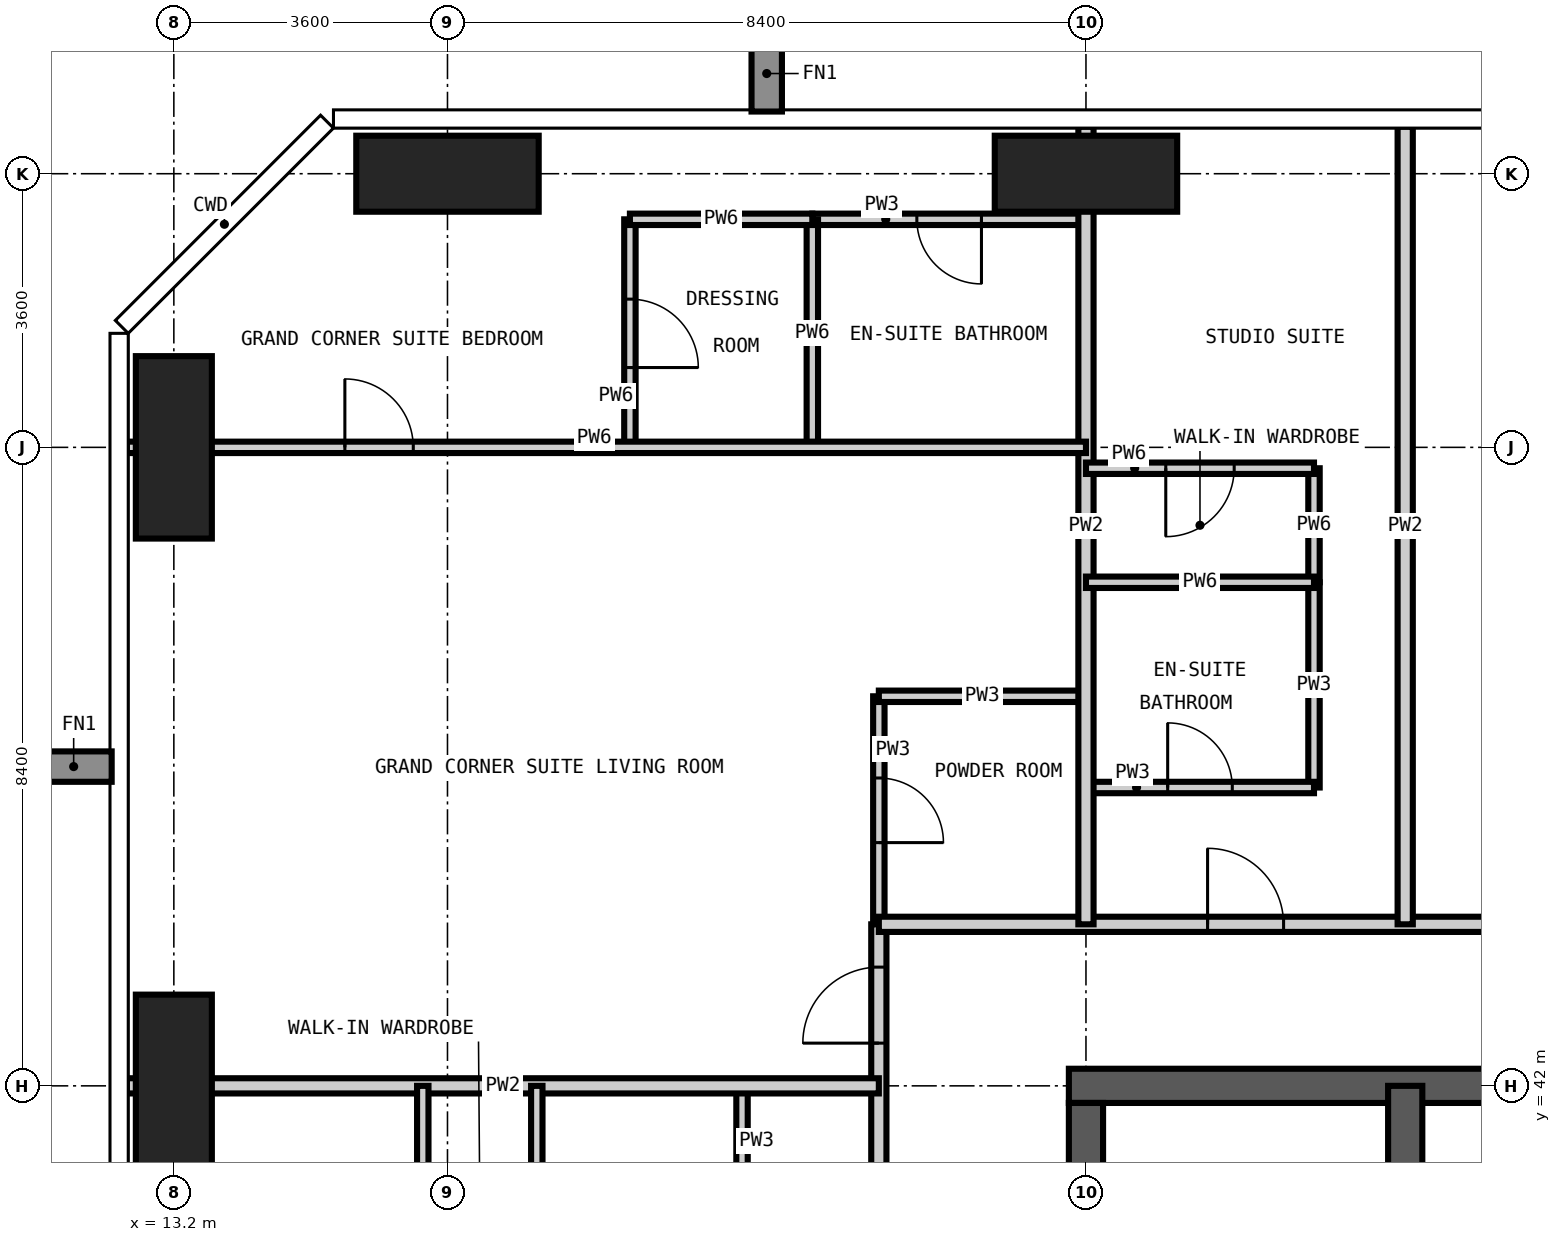
"""IFC4 building model, lengths in metres.
Left out: names, types, materials, properties, quantities, classifications, styles, units other than length and angle.
Written with IfcOpenShell. Run it as: python <this file> out.ifc"""

import sys

from ifc_helpers import new_model, si_unit, direction, frame, frame_2d, origin, origin_2d, place, context, subcontext, project, spatial, rectangle, extrude, element, fill, save


model = new_model("IFC4")
c1 = context("Model", 3, precision=1e-05, world=origin(), true_north=direction((0.0, 1.0)))
c2 = subcontext(c1, "Body", "Model", "MODEL_VIEW")
j1 = project(units=[si_unit("LENGTHUNIT", "METRE"), si_unit("PLANEANGLEUNIT", "RADIAN")], contexts=[c1])
p1 = place(None, origin())
s1 = spatial("IfcSite", under=j1, at=p1, CompositionType="ELEMENT")
p2 = place(p1, origin())
s2 = spatial("IfcBuilding", under=s1, at=p2, CompositionType="ELEMENT")
p3 = place(p2, frame((0.0, 0.0, 264.6)))
s3 = spatial("IfcBuildingStorey", under=s2, at=p3, CompositionType="ELEMENT", Elevation=264.6)
for number, where, z_axis, x_axis in (
    (1, (13.2, 42.0, -0.35), (0.0, 0.0, 1.0), (1.0, 0.0, 0.0)),
    (2, (13.2, 50.4, -0.35), (0.0, 0.0, 1.0), (1.0, 0.0, 0.0)),
):
    element("IfcColumn", number, at=place(p3, frame(where, z_axis=z_axis, x_axis=x_axis)), inside=s3, PredefinedType="COLUMN", context=c2, shape_type="SweptSolid", body=[
        extrude(rectangle(XDim=1.0, YDim=2.4, at=origin_2d()), origin(), (0.0, 0.0, 1.0), 3.9),
    ])
for number, where, z_axis, x_axis in (
    (3, (16.8, 54.0, -0.35), (0.0, 0.0, 1.0), (1.0, 0.0, 0.0)),
    (4, (25.2, 54.0, -0.35), (0.0, 0.0, 1.0), (1.0, 0.0, 0.0)),
):
    element("IfcColumn", number, at=place(p3, frame(where, z_axis=z_axis, x_axis=x_axis)), inside=s3, PredefinedType="COLUMN", context=c2, shape_type="SweptSolid", body=[
        extrude(rectangle(XDim=2.4, YDim=1.0, at=origin_2d()), origin(), (0.0, 0.0, 1.0), 3.9),
    ])
p4 = place(p3, frame((42.225, 42.0, -0.35), z_axis=(0.0, 0.0, 1.0), x_axis=(-1.0, 0.0, 0.0)))
e5 = element("IfcWall", 5, at=p4, inside=s3, PredefinedType="SHEAR", context=c2, shape_type="SweptSolid", body=[
    extrude(rectangle(XDim=17.25, YDim=0.45, at=frame_2d((8.625, 0.0))), origin(), (0.0, 0.0, 1.0), 3.9),
])
p5 = place(p4, frame((10.125, 0.0, 0.35)))
e6 = element("IfcOpeningElement", 6, at=p5, cuts=e5, PredefinedType="OPENING", context=c2, shape_type="SweptSolid", body=[
    extrude(rectangle(XDim=1.2, YDim=2.2, at=frame_2d((0.6, 1.1))), frame((0.0, 0.235, 0.0), z_axis=(0.0, -1.0, 0.0), x_axis=(1.0, 0.0, 0.0)), (0.0, 0.0, 1.0), 0.47),
])
p6 = place(p3, frame((25.2, 41.775, -0.35), z_axis=(0.0, 0.0, 1.0), x_axis=(0.0, -1.0, 0.0)))
e7 = element("IfcWall", 7, at=p6, inside=s3, PredefinedType="SHEAR", context=c2, shape_type="SweptSolid", body=[
    extrude(rectangle(XDim=24.75, YDim=0.45, at=frame_2d((12.375, 0.0))), origin(), (0.0, 0.0, 1.0), 3.9),
])
p7 = place(p6, frame((11.875, 0.0, 0.35)))
e8 = element("IfcOpeningElement", 8, at=p7, cuts=e7, PredefinedType="OPENING", context=c2, shape_type="SweptSolid", body=[
    extrude(rectangle(XDim=1.0, YDim=2.1, at=frame_2d((0.5, 1.05))), frame((0.0, 0.235, 0.0), z_axis=(0.0, -1.0, 0.0), x_axis=(1.0, 0.0, 0.0)), (0.0, 0.0, 1.0), 0.47),
])
p8 = place(p3, frame((29.4, 33.6, -0.35), z_axis=(0.0, 0.0, 1.0), x_axis=(0.0, 1.0, 0.0)))
e9 = element("IfcWall", 9, at=p8, inside=s3, PredefinedType="SHEAR", context=c2, shape_type="SweptSolid", body=[
    extrude(rectangle(XDim=8.4, YDim=0.45, at=frame_2d((4.2, 0.0))), origin(), (0.0, 0.0, 1.0), 3.9),
])
p9 = place(p8, frame((0.525, 0.0, 0.35)))
e10 = element("IfcOpeningElement", 10, at=p9, cuts=e9, PredefinedType="OPENING", context=c2, shape_type="SweptSolid", body=[
    extrude(rectangle(XDim=1.2, YDim=2.2, at=frame_2d((0.6, 1.1))), frame((0.0, 0.235, 0.0), z_axis=(0.0, -1.0, 0.0), x_axis=(1.0, 0.0, 0.0)), (0.0, 0.0, 1.0), 0.47),
])
p10 = place(p3, frame((20.675, 39.0, 0.0), z_axis=(0.0, 0.0, 1.0), x_axis=(0.0, 1.0, 0.0)))
e11 = element("IfcWall", 11, at=p10, inside=s3, PredefinedType="PARTITIONING", context=c2, shape_type="SweptSolid", body=[
    extrude(rectangle(XDim=3.0, YDim=0.15, at=frame_2d((1.5, 0.0))), origin(), (0.0, 0.0, 1.0), 3.55),
])
p11 = place(p10, frame((1.075, 0.0, 0.0)))
e12 = element("IfcOpeningElement", 12, at=p11, cuts=e11, PredefinedType="OPENING", context=c2, shape_type="SweptSolid", body=[
    extrude(rectangle(XDim=0.85, YDim=2.1, at=frame_2d((0.425, 1.05))), frame((0.0, 0.085, 0.0), z_axis=(0.0, -1.0, 0.0), x_axis=(1.0, 0.0, 0.0)), (0.0, 0.0, 1.0), 0.17),
])
p12 = place(p3, frame((22.475, 44.125, 0.0), z_axis=(0.0, 0.0, 1.0), x_axis=(0.0, 1.0, 0.0)))
e13 = element("IfcWall", 13, at=p12, inside=s3, PredefinedType="PARTITIONING", context=c2, shape_type="SweptSolid", body=[
    extrude(rectangle(XDim=3.0, YDim=0.15, at=frame_2d((1.5, 0.0))), origin(), (0.0, 0.0, 1.0), 3.55),
])
p13 = place(p12, frame((1.075, 0.0, 0.0)))
e14 = element("IfcOpeningElement", 14, at=p13, cuts=e13, PredefinedType="OPENING", context=c2, shape_type="SweptSolid", body=[
    extrude(rectangle(XDim=0.85, YDim=2.1, at=frame_2d((0.425, 1.05))), frame((0.0, 0.085, 0.0), z_axis=(0.0, -1.0, 0.0), x_axis=(1.0, 0.0, 0.0)), (0.0, 0.0, 1.0), 0.17),
])
p14 = place(p3, frame((28.2, 45.925, 0.0), z_axis=(0.0, 0.0, 1.0), x_axis=(0.0, 1.0, 0.0)))
e15 = element("IfcWall", 15, at=p14, inside=s3, PredefinedType="PARTITIONING", context=c2, shape_type="SweptSolid", body=[
    extrude(rectangle(XDim=2.7, YDim=0.15, at=frame_2d((1.35, 0.0))), origin(), (0.0, 0.0, 1.0), 3.55),
])
p15 = place(p3, frame((25.2, 45.925, 0.0), z_axis=(0.0, 0.0, 1.0), x_axis=(1.0, 0.0, 0.0)))
e16 = element("IfcWall", 16, at=p15, inside=s3, PredefinedType="PARTITIONING", context=c2, shape_type="SweptSolid", body=[
    extrude(rectangle(XDim=3.0, YDim=0.15, at=frame_2d((1.5, 0.0))), origin(), (0.0, 0.0, 1.0), 3.55),
])
p16 = place(p15, frame((1.075, 0.0, 0.0)))
e17 = element("IfcOpeningElement", 17, at=p16, cuts=e16, PredefinedType="OPENING", context=c2, shape_type="SweptSolid", body=[
    extrude(rectangle(XDim=0.85, YDim=2.1, at=frame_2d((0.425, 1.05))), frame((0.0, 0.085, 0.0), z_axis=(0.0, -1.0, 0.0), x_axis=(1.0, 0.0, 0.0)), (0.0, 0.0, 1.0), 0.17),
])
p17 = place(p3, frame((22.475, 47.125, 0.0), z_axis=(0.0, 0.0, 1.0), x_axis=(1.0, 0.0, 0.0)))
e18 = element("IfcWall", 18, at=p17, inside=s3, PredefinedType="PARTITIONING", context=c2, shape_type="SweptSolid", body=[
    extrude(rectangle(XDim=2.725, YDim=0.15, at=frame_2d((1.362, 0.0))), origin(), (0.0, 0.0, 1.0), 3.55),
])
p18 = place(p3, frame((21.6, 53.4, 0.0), z_axis=(0.0, 0.0, 1.0), x_axis=(1.0, 0.0, 0.0)))
e19 = element("IfcWall", 19, at=p18, inside=s3, PredefinedType="PARTITIONING", context=c2, shape_type="SweptSolid", body=[
    extrude(rectangle(XDim=3.6, YDim=0.15, at=frame_2d((1.8, 0.0))), origin(), (0.0, 0.0, 1.0), 3.55),
])
p19 = place(p18, frame((1.375, 0.0, 0.0)))
e20 = element("IfcOpeningElement", 20, at=p19, cuts=e19, PredefinedType="OPENING", context=c2, shape_type="SweptSolid", body=[
    extrude(rectangle(XDim=0.85, YDim=2.1, at=frame_2d((0.425, 1.05))), frame((0.0, 0.085, 0.0), z_axis=(0.0, -1.0, 0.0), x_axis=(1.0, 0.0, 0.0)), (0.0, 0.0, 1.0), 0.17),
])
p20 = place(p3, frame((22.475, 14.075, 0.0), z_axis=(0.0, 0.0, 1.0), x_axis=(0.0, 1.0, 0.0)))
e21 = element("IfcWall", 21, at=p20, inside=s3, PredefinedType="PARTITIONING", context=c2, shape_type="SweptSolid", body=[
    extrude(rectangle(XDim=30.05, YDim=0.2, at=frame_2d((15.025, 0.0))), origin(), (0.0, 0.0, 1.0), 3.55),
])
p21 = place(p20, frame((4.325, 0.0, 0.0)))
e22 = element("IfcOpeningElement", 22, at=p21, cuts=e21, PredefinedType="OPENING", context=c2, shape_type="SweptSolid", body=[
    extrude(rectangle(XDim=1.0, YDim=2.2, at=frame_2d((0.5, 1.1))), frame((0.0, 0.11, 0.0), z_axis=(0.0, -1.0, 0.0), x_axis=(1.0, 0.0, 0.0)), (0.0, 0.0, 1.0), 0.22),
])
p22 = place(p20, frame((8.525, 0.0, 0.0)))
e23 = element("IfcOpeningElement", 23, at=p22, cuts=e21, PredefinedType="OPENING", context=c2, shape_type="SweptSolid", body=[
    extrude(rectangle(XDim=1.0, YDim=2.2, at=frame_2d((0.5, 1.1))), frame((0.0, 0.11, 0.0), z_axis=(0.0, -1.0, 0.0), x_axis=(1.0, 0.0, 0.0)), (0.0, 0.0, 1.0), 0.22),
])
p23 = place(p20, frame((13.625, 0.0, 0.0)))
e24 = element("IfcOpeningElement", 24, at=p23, cuts=e21, PredefinedType="OPENING", context=c2, shape_type="SweptSolid", body=[
    extrude(rectangle(XDim=1.0, YDim=2.2, at=frame_2d((0.5, 1.1))), frame((0.0, 0.11, 0.0), z_axis=(0.0, -1.0, 0.0), x_axis=(1.0, 0.0, 0.0)), (0.0, 0.0, 1.0), 0.22),
])
p24 = place(p20, frame((25.325, 0.0, 0.0)))
e25 = element("IfcOpeningElement", 25, at=p24, cuts=e21, PredefinedType="OPENING", context=c2, shape_type="SweptSolid", body=[
    extrude(rectangle(XDim=1.0, YDim=2.2, at=frame_2d((0.5, 1.1))), frame((0.0, 0.11, 0.0), z_axis=(0.0, -1.0, 0.0), x_axis=(1.0, 0.0, 0.0)), (0.0, 0.0, 1.0), 0.22),
])
p25 = place(p20, frame((0.863, 0.0, 0.0)))
e26 = element("IfcOpeningElement", 26, at=p25, cuts=e21, PredefinedType="OPENING", context=c2, shape_type="SweptSolid", body=[
    extrude(rectangle(XDim=1.0, YDim=2.2, at=frame_2d((0.5, 1.1))), frame((0.0, 0.11, 0.0), z_axis=(0.0, -1.0, 0.0), x_axis=(1.0, 0.0, 0.0)), (0.0, 0.0, 1.0), 0.22),
])
p26 = place(p20, frame((28.487, 0.0, 0.0)))
e27 = element("IfcOpeningElement", 27, at=p26, cuts=e21, PredefinedType="OPENING", context=c2, shape_type="SweptSolid", body=[
    extrude(rectangle(XDim=1.0, YDim=2.2, at=frame_2d((0.5, 1.1))), frame((0.0, 0.11, 0.0), z_axis=(0.0, -1.0, 0.0), x_axis=(1.0, 0.0, 0.0)), (0.0, 0.0, 1.0), 0.22),
])
p27 = place(p3, frame((22.475, 44.125, 0.0), z_axis=(0.0, 0.0, 1.0), x_axis=(1.0, 0.0, 0.0)))
e28 = element("IfcWall", 28, at=p27, inside=s3, PredefinedType="PARTITIONING", context=c2, shape_type="SweptSolid", body=[
    extrude(rectangle(XDim=22.85, YDim=0.2, at=frame_2d((11.425, 0.0))), origin(), (0.0, 0.0, 1.0), 3.55),
])
p28 = place(p27, frame((4.325, 0.0, 0.0)))
e29 = element("IfcOpeningElement", 29, at=p28, cuts=e28, PredefinedType="OPENING", context=c2, shape_type="SweptSolid", body=[
    extrude(rectangle(XDim=1.0, YDim=2.2, at=frame_2d((0.5, 1.1))), frame((0.0, 0.11, 0.0), z_axis=(0.0, -1.0, 0.0), x_axis=(1.0, 0.0, 0.0)), (0.0, 0.0, 1.0), 0.22),
])
p29 = place(p27, frame((10.625, 0.0, 0.0)))
e30 = element("IfcOpeningElement", 30, at=p29, cuts=e28, PredefinedType="OPENING", context=c2, shape_type="SweptSolid", body=[
    extrude(rectangle(XDim=1.0, YDim=2.2, at=frame_2d((0.5, 1.1))), frame((0.0, 0.11, 0.0), z_axis=(0.0, -1.0, 0.0), x_axis=(1.0, 0.0, 0.0)), (0.0, 0.0, 1.0), 0.22),
])
p30 = place(p27, frame((16.925, 0.0, 0.0)))
e31 = element("IfcOpeningElement", 31, at=p30, cuts=e28, PredefinedType="OPENING", context=c2, shape_type="SweptSolid", body=[
    extrude(rectangle(XDim=1.0, YDim=2.2, at=frame_2d((0.5, 1.1))), frame((0.0, 0.11, 0.0), z_axis=(0.0, -1.0, 0.0), x_axis=(1.0, 0.0, 0.0)), (0.0, 0.0, 1.0), 0.22),
])
for number, where, z_axis, x_axis in (
    (32, (25.2, 44.125, 0.0), (0.0, 0.0, 1.0), (0.0, 1.0, 0.0)),
    (33, (29.4, 44.125, 0.0), (0.0, 0.0, 1.0), (0.0, 1.0, 0.0)),
):
    element("IfcWall", number, at=place(p3, frame(where, z_axis=z_axis, x_axis=x_axis)), inside=s3, PredefinedType="PARTITIONING", context=c2, shape_type="SweptSolid", body=[
        extrude(rectangle(XDim=10.493, YDim=0.2, at=frame_2d((5.247, 0.0))), origin(), (0.0, 0.0, 1.0), 3.55),
    ])
p31 = place(p3, frame((12.582, 42.0, 0.0), z_axis=(0.0, 0.0, 1.0), x_axis=(1.0, 0.0, 0.0)))
e34 = element("IfcWall", 34, at=p31, inside=s3, PredefinedType="PARTITIONING", context=c2, shape_type="SweptSolid", body=[
    extrude(rectangle(XDim=9.893, YDim=0.2, at=frame_2d((4.947, 0.0))), origin(), (0.0, 0.0, 1.0), 3.55),
])
p32 = place(p3, frame((16.475, 39.0, 0.0), z_axis=(0.0, 0.0, 1.0), x_axis=(0.0, 1.0, 0.0)))
e35 = element("IfcWall", 35, at=p32, inside=s3, PredefinedType="PARTITIONING", context=c2, shape_type="SweptSolid", body=[
    extrude(rectangle(XDim=3.0, YDim=0.15, at=frame_2d((1.5, 0.0))), origin(), (0.0, 0.0, 1.0), 3.55),
])
p33 = place(p32, frame((1.05, 0.0, 0.0)))
e36 = element("IfcOpeningElement", 36, at=p33, cuts=e35, PredefinedType="OPENING", context=c2, shape_type="SweptSolid", body=[
    extrude(rectangle(XDim=0.9, YDim=2.1, at=frame_2d((0.45, 1.05))), frame((0.0, 0.085, 0.0), z_axis=(0.0, -1.0, 0.0), x_axis=(1.0, 0.0, 0.0)), (0.0, 0.0, 1.0), 0.17),
])
p34 = place(p3, frame((17.975, 39.0, 0.0), z_axis=(0.0, 0.0, 1.0), x_axis=(0.0, 1.0, 0.0)))
e37 = element("IfcWall", 37, at=p34, inside=s3, PredefinedType="PARTITIONING", context=c2, shape_type="SweptSolid", body=[
    extrude(rectangle(XDim=3.0, YDim=0.15, at=frame_2d((1.5, 0.0))), origin(), (0.0, 0.0, 1.0), 3.55),
])
p35 = place(p3, frame((19.2, 50.4, 0.0), z_axis=(0.0, 0.0, 1.0), x_axis=(0.0, 1.0, 0.0)))
e38 = element("IfcWall", 38, at=p35, inside=s3, PredefinedType="PARTITIONING", context=c2, shape_type="SweptSolid", body=[
    extrude(rectangle(XDim=3.0, YDim=0.15, at=frame_2d((1.5, 0.0))), origin(), (0.0, 0.0, 1.0), 3.55),
])
p36 = place(p35, frame((1.05, 0.0, 0.0)))
e39 = element("IfcOpeningElement", 39, at=p36, cuts=e38, PredefinedType="OPENING", context=c2, shape_type="SweptSolid", body=[
    extrude(rectangle(XDim=0.9, YDim=2.1, at=frame_2d((0.45, 1.05))), frame((0.0, 0.085, 0.0), z_axis=(0.0, -1.0, 0.0), x_axis=(1.0, 0.0, 0.0)), (0.0, 0.0, 1.0), 0.17),
])
p37 = place(p3, frame((21.6, 50.4, 0.0), z_axis=(0.0, 0.0, 1.0), x_axis=(0.0, 1.0, 0.0)))
e40 = element("IfcWall", 40, at=p37, inside=s3, PredefinedType="PARTITIONING", context=c2, shape_type="SweptSolid", body=[
    extrude(rectangle(XDim=3.0, YDim=0.15, at=frame_2d((1.5, 0.0))), origin(), (0.0, 0.0, 1.0), 3.55),
])
p38 = place(p3, frame((28.2, 48.625, 0.0), z_axis=(0.0, 0.0, 1.0), x_axis=(0.0, 1.0, 0.0)))
e41 = element("IfcWall", 41, at=p38, inside=s3, PredefinedType="PARTITIONING", context=c2, shape_type="SweptSolid", body=[
    extrude(rectangle(XDim=1.5, YDim=0.15, at=frame_2d((0.75, 0.0))), origin(), (0.0, 0.0, 1.0), 3.55),
])
p39 = place(p3, frame((25.2, 48.625, 0.0), z_axis=(0.0, 0.0, 1.0), x_axis=(1.0, 0.0, 0.0)))
e42 = element("IfcWall", 42, at=p39, inside=s3, PredefinedType="PARTITIONING", context=c2, shape_type="SweptSolid", body=[
    extrude(rectangle(XDim=3.0, YDim=0.15, at=frame_2d((1.5, 0.0))), origin(), (0.0, 0.0, 1.0), 3.55),
])
p40 = place(p3, frame((25.2, 50.125, 0.0), z_axis=(0.0, 0.0, 1.0), x_axis=(1.0, 0.0, 0.0)))
e43 = element("IfcWall", 43, at=p40, inside=s3, PredefinedType="PARTITIONING", context=c2, shape_type="SweptSolid", body=[
    extrude(rectangle(XDim=3.0, YDim=0.15, at=frame_2d((1.5, 0.0))), origin(), (0.0, 0.0, 1.0), 3.55),
])
p41 = place(p40, frame((1.05, 0.0, 0.0)))
e44 = element("IfcOpeningElement", 44, at=p41, cuts=e43, PredefinedType="OPENING", context=c2, shape_type="SweptSolid", body=[
    extrude(rectangle(XDim=0.9, YDim=2.1, at=frame_2d((0.45, 1.05))), frame((0.0, 0.085, 0.0), z_axis=(0.0, -1.0, 0.0), x_axis=(1.0, 0.0, 0.0)), (0.0, 0.0, 1.0), 0.17),
])
p42 = place(p3, frame((12.582, 50.4, 0.0), z_axis=(0.0, 0.0, 1.0), x_axis=(1.0, 0.0, 0.0)))
e45 = element("IfcWall", 45, at=p42, inside=s3, PredefinedType="PARTITIONING", context=c2, shape_type="SweptSolid", body=[
    extrude(rectangle(XDim=12.618, YDim=0.15, at=frame_2d((6.309, 0.0))), origin(), (0.0, 0.0, 1.0), 3.55),
])
p43 = place(p42, frame((2.868, 0.0, 0.0)))
e46 = element("IfcOpeningElement", 46, at=p43, cuts=e45, PredefinedType="OPENING", context=c2, shape_type="SweptSolid", body=[
    extrude(rectangle(XDim=0.9, YDim=2.1, at=frame_2d((0.45, 1.05))), frame((0.0, 0.085, 0.0), z_axis=(0.0, -1.0, 0.0), x_axis=(1.0, 0.0, 0.0)), (0.0, 0.0, 1.0), 0.17),
])
p44 = place(p3, frame((19.2, 53.4, 0.0), z_axis=(0.0, 0.0, 1.0), x_axis=(1.0, 0.0, 0.0)))
e47 = element("IfcWall", 47, at=p44, inside=s3, PredefinedType="PARTITIONING", context=c2, shape_type="SweptSolid", body=[
    extrude(rectangle(XDim=2.4, YDim=0.15, at=frame_2d((1.2, 0.0))), origin(), (0.0, 0.0, 1.0), 3.55),
])
p45 = place(p28, origin())
e48 = element("IfcDoor", 48, at=p45, inside=s3, OperationType="SINGLE_SWING_LEFT", PredefinedType="DOOR", context=c2, shape_type="SweptSolid", body=[
    extrude(rectangle(XDim=1.0, YDim=2.2, at=frame_2d((0.5, 1.1))), frame((0.0, 0.025, 0.0), z_axis=(0.0, -1.0, 0.0), x_axis=(1.0, 0.0, 0.0)), (0.0, 0.0, 1.0), 0.05),
])
fill(e29, e48)
p46 = place(p16, origin())
e49 = element("IfcDoor", 49, at=p46, inside=s3, OperationType="SINGLE_SWING_LEFT", PredefinedType="DOOR", context=c2, shape_type="SweptSolid", body=[
    extrude(rectangle(XDim=0.85, YDim=2.1, at=frame_2d((0.425, 1.05))), frame((0.0, 0.025, 0.0), z_axis=(0.0, -1.0, 0.0), x_axis=(1.0, 0.0, 0.0)), (0.0, 0.0, 1.0), 0.05),
])
fill(e17, e49)
p47 = place(p41, frame((0.9, 0.0, 0.0), z_axis=(0.0, 0.0, 1.0), x_axis=(-1.0, 0.0, 0.0)))
e50 = element("IfcDoor", 50, at=p47, inside=s3, OperationType="SINGLE_SWING_RIGHT", PredefinedType="DOOR", context=c2, shape_type="SweptSolid", body=[
    extrude(rectangle(XDim=0.9, YDim=2.1, at=frame_2d((0.45, 1.05))), frame((0.0, 0.025, 0.0), z_axis=(0.0, -1.0, 0.0), x_axis=(1.0, 0.0, 0.0)), (0.0, 0.0, 1.0), 0.05),
])
fill(e44, e50)
p48 = place(p26, origin())
e51 = element("IfcDoor", 51, at=p48, inside=s3, OperationType="SINGLE_SWING_LEFT", PredefinedType="DOOR", context=c2, shape_type="SweptSolid", body=[
    extrude(rectangle(XDim=1.0, YDim=2.2, at=frame_2d((0.5, 1.1))), frame((0.0, 0.025, 0.0), z_axis=(0.0, -1.0, 0.0), x_axis=(1.0, 0.0, 0.0)), (0.0, 0.0, 1.0), 0.05),
])
fill(e27, e51)
p49 = place(p13, frame((0.85, 0.0, 0.0), z_axis=(0.0, 0.0, 1.0), x_axis=(-1.0, 0.0, 0.0)))
e52 = element("IfcDoor", 52, at=p49, inside=s3, OperationType="SINGLE_SWING_RIGHT", PredefinedType="DOOR", context=c2, shape_type="SweptSolid", body=[
    extrude(rectangle(XDim=0.85, YDim=2.1, at=frame_2d((0.425, 1.05))), frame((0.0, 0.025, 0.0), z_axis=(0.0, -1.0, 0.0), x_axis=(1.0, 0.0, 0.0)), (0.0, 0.0, 1.0), 0.05),
])
fill(e14, e52)
p50 = place(p43, origin())
e53 = element("IfcDoor", 53, at=p50, inside=s3, OperationType="SINGLE_SWING_LEFT", PredefinedType="DOOR", context=c2, shape_type="SweptSolid", body=[
    extrude(rectangle(XDim=0.9, YDim=2.1, at=frame_2d((0.45, 1.05))), frame((0.0, 0.025, 0.0), z_axis=(0.0, -1.0, 0.0), x_axis=(1.0, 0.0, 0.0)), (0.0, 0.0, 1.0), 0.05),
])
fill(e46, e53)
p51 = place(p19, frame((0.85, 0.0, 0.0), z_axis=(0.0, 0.0, 1.0), x_axis=(-1.0, 0.0, 0.0)))
e54 = element("IfcDoor", 54, at=p51, inside=s3, OperationType="SINGLE_SWING_LEFT", PredefinedType="DOOR", context=c2, shape_type="SweptSolid", body=[
    extrude(rectangle(XDim=0.85, YDim=2.1, at=frame_2d((0.425, 1.05))), frame((0.0, 0.025, 0.0), z_axis=(0.0, -1.0, 0.0), x_axis=(1.0, 0.0, 0.0)), (0.0, 0.0, 1.0), 0.05),
])
fill(e20, e54)
p52 = place(p36, frame((0.9, 0.0, 0.0), z_axis=(0.0, 0.0, 1.0), x_axis=(-1.0, 0.0, 0.0)))
e55 = element("IfcDoor", 55, at=p52, inside=s3, OperationType="SINGLE_SWING_RIGHT", PredefinedType="DOOR", context=c2, shape_type="SweptSolid", body=[
    extrude(rectangle(XDim=0.9, YDim=2.1, at=frame_2d((0.45, 1.05))), frame((0.0, 0.025, 0.0), z_axis=(0.0, -1.0, 0.0), x_axis=(1.0, 0.0, 0.0)), (0.0, 0.0, 1.0), 0.05),
])
fill(e39, e55)
save(model, sys.argv[1])
